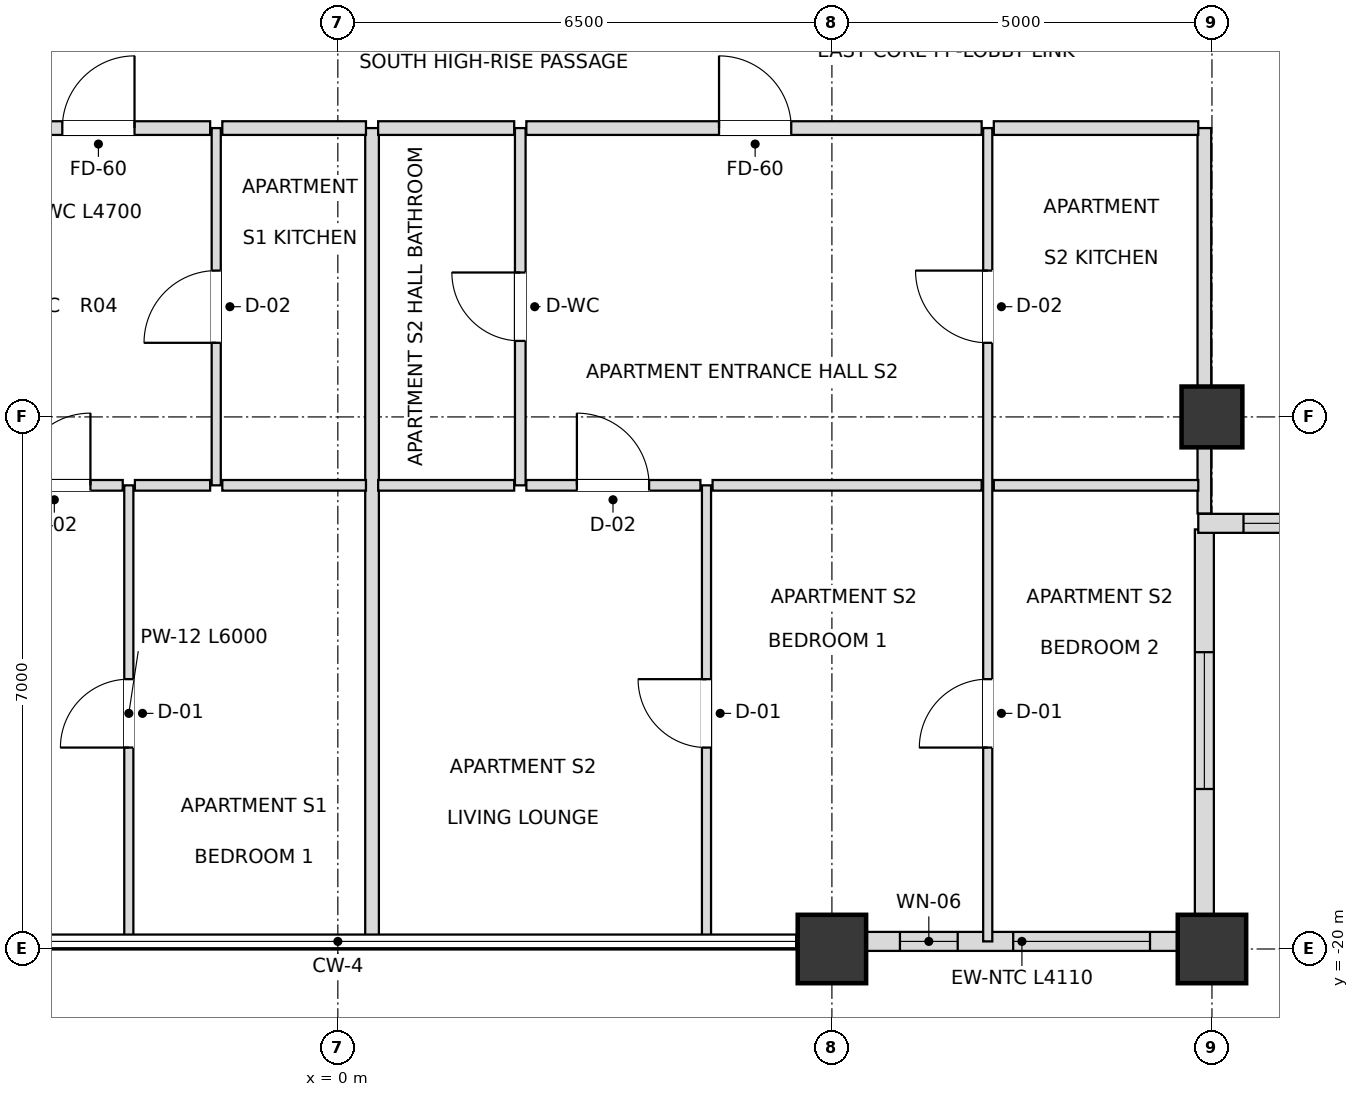
"""IFC4 building model, lengths in metres.
Left out: names, types, materials, properties, quantities, classifications, styles, units other than length and angle.
Written with IfcOpenShell. Run it as: python <this file> out.ifc"""

import sys

from ifc_helpers import new_model, si_unit, direction, frame, frame_2d, origin, origin_2d, place, context, subcontext, project, spatial, rectangle, extrude, element, fill, save


model = new_model("IFC4")
c1 = context("Model", 3, precision=1e-05, world=origin(), true_north=direction((0.0, 1.0)))
c2 = subcontext(c1, "Body", "Model", "MODEL_VIEW")
j1 = project(units=[si_unit("LENGTHUNIT", "METRE"), si_unit("PLANEANGLEUNIT", "RADIAN")], contexts=[c1])
p1 = place(None, origin())
s1 = spatial("IfcSite", under=j1, at=p1, CompositionType="ELEMENT")
p2 = place(p1, origin())
s2 = spatial("IfcBuilding", under=s1, at=p2, CompositionType="ELEMENT")
p3 = place(p2, frame((0.0, 0.0, 243.9)))
s3 = spatial("IfcBuildingStorey", under=s2, at=p3, CompositionType="ELEMENT", Elevation=243.9)
for number, where, z_axis, x_axis in (
    (1, (6.5, -20.0, 0.0), (0.0, 0.0, 1.0), (1.0, 0.0, 0.0)),
    (2, (11.5, -20.0, 0.0), (0.0, 0.0, 1.0), (1.0, 0.0, 0.0)),
):
    element("IfcColumn", number, at=place(p3, frame(where, z_axis=z_axis, x_axis=x_axis)), inside=s3, PredefinedType="USERDEFINED", context=c2, shape_type="SweptSolid", body=[
        extrude(rectangle(XDim=0.9, YDim=0.9, at=origin_2d()), origin(), (0.0, 0.0, 1.0), 3.6),
    ])
p4 = place(p3, frame((11.5, -13.0, 0.0), z_axis=(0.0, 0.0, 1.0), x_axis=(1.0, 0.0, 0.0)))
e3 = element("IfcColumn", 3, at=p4, inside=s3, PredefinedType="COLUMN", context=c2, shape_type="SweptSolid", body=[
    extrude(rectangle(XDim=0.8, YDim=0.8, at=origin_2d()), origin(), (0.0, 0.0, 1.0), 3.6),
])
p5 = place(p3, frame((6.945, -19.9, 0.0), z_axis=(0.0, 0.0, 1.0), x_axis=(1.0, 0.0, 0.0)))
e4 = element("IfcWall", 4, at=p5, inside=s3, PredefinedType="SOLIDWALL", context=c2, shape_type="SweptSolid", body=[
    extrude(rectangle(XDim=4.11, YDim=0.25, at=frame_2d((2.055, 0.0))), origin(), (0.0, 0.0, 1.0), 2.748),
])
p6 = place(p5, frame((0.45, 0.0, 0.72)))
e5 = element("IfcOpeningElement", 5, at=p6, cuts=e4, PredefinedType="OPENING", context=c2, shape_type="SweptSolid", body=[
    extrude(rectangle(XDim=0.76, YDim=1.68, at=frame_2d((0.38, 0.84))), frame((0.0, 0.135, 0.0), z_axis=(0.0, -1.0, 0.0), x_axis=(1.0, 0.0, 0.0)), (0.0, 0.0, 1.0), 0.27),
])
p7 = place(p5, frame((1.94, 0.0, 0.72)))
e6 = element("IfcOpeningElement", 6, at=p7, cuts=e4, PredefinedType="OPENING", context=c2, shape_type="SweptSolid", body=[
    extrude(rectangle(XDim=1.8, YDim=1.68, at=frame_2d((0.9, 0.84))), frame((0.0, 0.135, 0.0), z_axis=(0.0, -1.0, 0.0), x_axis=(1.0, 0.0, 0.0)), (0.0, 0.0, 1.0), 0.27),
])
p8 = place(p3, frame((11.4, -19.82, 0.0), z_axis=(0.0, 0.0, 1.0), x_axis=(0.0, 1.0, 0.0)))
e7 = element("IfcWall", 7, at=p8, inside=s3, PredefinedType="SOLIDWALL", context=c2, shape_type="SweptSolid", body=[
    extrude(rectangle(XDim=5.34, YDim=0.25, at=frame_2d((2.67, 0.0))), origin(), (0.0, 0.0, 1.0), 2.748),
])
p9 = place(p8, frame((1.925, 0.0, 0.72)))
e8 = element("IfcOpeningElement", 8, at=p9, cuts=e7, PredefinedType="OPENING", context=c2, shape_type="SweptSolid", body=[
    extrude(rectangle(XDim=1.8, YDim=1.68, at=frame_2d((0.9, 0.84))), frame((0.0, 0.135, 0.0), z_axis=(0.0, -1.0, 0.0), x_axis=(1.0, 0.0, 0.0)), (0.0, 0.0, 1.0), 0.27),
])
p10 = place(p3, frame((11.32, -14.4, 0.0), z_axis=(0.0, 0.0, 1.0), x_axis=(1.0, 0.0, 0.0)))
e9 = element("IfcWall", 9, at=p10, inside=s3, PredefinedType="SOLIDWALL", context=c2, shape_type="SweptSolid", body=[
    extrude(rectangle(XDim=5.66, YDim=0.25, at=frame_2d((2.83, 0.0))), origin(), (0.0, 0.0, 1.0), 2.748),
])
p11 = place(p10, frame((0.595, 0.0, 0.72)))
e10 = element("IfcOpeningElement", 10, at=p11, cuts=e9, PredefinedType="OPENING", context=c2, shape_type="SweptSolid", body=[
    extrude(rectangle(XDim=1.8, YDim=1.68, at=frame_2d((0.9, 0.84))), frame((0.0, 0.135, 0.0), z_axis=(0.0, -1.0, 0.0), x_axis=(1.0, 0.0, 0.0)), (0.0, 0.0, 1.0), 0.27),
])
p12 = place(p10, frame((3.265, 0.0, 0.72)))
e11 = element("IfcOpeningElement", 11, at=p12, cuts=e9, PredefinedType="OPENING", context=c2, shape_type="SweptSolid", body=[
    extrude(rectangle(XDim=1.8, YDim=1.68, at=frame_2d((0.9, 0.84))), frame((0.0, 0.135, 0.0), z_axis=(0.0, -1.0, 0.0), x_axis=(1.0, 0.0, 0.0)), (0.0, 0.0, 1.0), 0.27),
])
p13 = place(p3, frame((-2.75, -19.9, 0.0), z_axis=(0.0, 0.0, 1.0), x_axis=(0.0, 1.0, 0.0)))
e12 = element("IfcWall", 12, at=p13, inside=s3, PredefinedType="PARTITIONING", context=c2, shape_type="SweptSolid", body=[
    extrude(rectangle(XDim=6.0, YDim=0.12, at=frame_2d((3.0, 0.0))), origin(), (0.0, 0.0, 1.0), 3.018),
])
p14 = place(p13, frame((2.55, 0.0, 0.0)))
e13 = element("IfcOpeningElement", 13, at=p14, cuts=e12, PredefinedType="OPENING", context=c2, shape_type="SweptSolid", body=[
    extrude(rectangle(XDim=0.9, YDim=2.1, at=frame_2d((0.45, 1.05))), frame((0.0, 0.07, 0.0), z_axis=(0.0, -1.0, 0.0), x_axis=(1.0, 0.0, 0.0)), (0.0, 0.0, 1.0), 0.14),
])
p15 = place(p3, frame((-1.6, -13.9, 0.0), z_axis=(0.0, 0.0, 1.0), x_axis=(0.0, 1.0, 0.0)))
e14 = element("IfcWall", 14, at=p15, inside=s3, PredefinedType="PARTITIONING", context=c2, shape_type="SweptSolid", body=[
    extrude(rectangle(XDim=4.7, YDim=0.12, at=frame_2d((2.35, 0.0))), origin(), (0.0, 0.0, 1.0), 3.38),
])
p16 = place(p15, frame((1.875, 0.0, 0.0)))
e15 = element("IfcOpeningElement", 15, at=p16, cuts=e14, PredefinedType="OPENING", context=c2, shape_type="SweptSolid", body=[
    extrude(rectangle(XDim=0.95, YDim=2.1, at=frame_2d((0.475, 1.05))), frame((0.0, 0.07, 0.0), z_axis=(0.0, -1.0, 0.0), x_axis=(1.0, 0.0, 0.0)), (0.0, 0.0, 1.0), 0.14),
])
p17 = place(p3, frame((0.45, -19.9, 0.0), z_axis=(0.0, 0.0, 1.0), x_axis=(0.0, 1.0, 0.0)))
e16 = element("IfcWall", 16, at=p17, inside=s3, PredefinedType="PARTITIONING", context=c2, shape_type="SweptSolid", body=[
    extrude(rectangle(XDim=10.7, YDim=0.18, at=frame_2d((5.35, 0.0))), origin(), (0.0, 0.0, 1.0), 3.018),
])
p18 = place(p3, frame((2.4, -13.9, 0.0), z_axis=(0.0, 0.0, 1.0), x_axis=(0.0, 1.0, 0.0)))
e17 = element("IfcWall", 17, at=p18, inside=s3, PredefinedType="PARTITIONING", context=c2, shape_type="SweptSolid", body=[
    extrude(rectangle(XDim=4.7, YDim=0.14, at=frame_2d((2.35, 0.0))), origin(), (0.0, 0.0, 1.0), 3.38),
])
p19 = place(p18, frame((1.9, 0.0, 0.0)))
e18 = element("IfcOpeningElement", 18, at=p19, cuts=e17, PredefinedType="OPENING", context=c2, shape_type="SweptSolid", body=[
    extrude(rectangle(XDim=0.9, YDim=2.1, at=frame_2d((0.45, 1.05))), frame((0.0, 0.08, 0.0), z_axis=(0.0, -1.0, 0.0), x_axis=(1.0, 0.0, 0.0)), (0.0, 0.0, 1.0), 0.16),
])
p20 = place(p3, frame((4.85, -19.9, 0.0), z_axis=(0.0, 0.0, 1.0), x_axis=(0.0, 1.0, 0.0)))
e19 = element("IfcWall", 19, at=p20, inside=s3, PredefinedType="PARTITIONING", context=c2, shape_type="SweptSolid", body=[
    extrude(rectangle(XDim=6.0, YDim=0.12, at=frame_2d((3.0, 0.0))), origin(), (0.0, 0.0, 1.0), 3.018),
])
p21 = place(p20, frame((2.55, 0.0, 0.0)))
e20 = element("IfcOpeningElement", 20, at=p21, cuts=e19, PredefinedType="OPENING", context=c2, shape_type="SweptSolid", body=[
    extrude(rectangle(XDim=0.9, YDim=2.1, at=frame_2d((0.45, 1.05))), frame((0.0, 0.07, 0.0), z_axis=(0.0, -1.0, 0.0), x_axis=(1.0, 0.0, 0.0)), (0.0, 0.0, 1.0), 0.14),
])
p22 = place(p3, frame((8.55, -19.9, 0.0), z_axis=(0.0, 0.0, 1.0), x_axis=(0.0, 1.0, 0.0)))
e21 = element("IfcWall", 21, at=p22, inside=s3, PredefinedType="PARTITIONING", context=c2, shape_type="SweptSolid", body=[
    extrude(rectangle(XDim=10.7, YDim=0.12, at=frame_2d((5.35, 0.0))), origin(), (0.0, 0.0, 1.0), 2.826),
])
p23 = place(p22, frame((7.875, 0.0, 0.0)))
e22 = element("IfcOpeningElement", 22, at=p23, cuts=e21, PredefinedType="OPENING", context=c2, shape_type="SweptSolid", body=[
    extrude(rectangle(XDim=0.95, YDim=2.1, at=frame_2d((0.475, 1.05))), frame((0.0, 0.07, 0.0), z_axis=(0.0, -1.0, 0.0), x_axis=(1.0, 0.0, 0.0)), (0.0, 0.0, 1.0), 0.14),
])
p24 = place(p22, frame((2.55, 0.0, 0.0)))
e23 = element("IfcOpeningElement", 23, at=p24, cuts=e21, PredefinedType="OPENING", context=c2, shape_type="SweptSolid", body=[
    extrude(rectangle(XDim=0.9, YDim=2.1, at=frame_2d((0.45, 1.05))), frame((0.0, 0.07, 0.0), z_axis=(0.0, -1.0, 0.0), x_axis=(1.0, 0.0, 0.0)), (0.0, 0.0, 1.0), 0.14),
])
p25 = place(p3, frame((11.4, -14.27, 0.0), z_axis=(0.0, 0.0, 1.0), x_axis=(0.0, 1.0, 0.0)))
e24 = element("IfcWall", 24, at=p25, inside=s3, PredefinedType="PARTITIONING", context=c2, shape_type="SweptSolid", body=[
    extrude(rectangle(XDim=5.07, YDim=0.18, at=frame_2d((2.535, 0.0))), origin(), (0.0, 0.0, 1.0), 2.748),
])
p26 = place(p3, frame((-4.62, -13.9, 0.0), z_axis=(0.0, 0.0, 1.0), x_axis=(1.0, 0.0, 0.0)))
e25 = element("IfcWall", 25, at=p26, inside=s3, PredefinedType="PARTITIONING", context=c2, shape_type="SweptSolid", body=[
    extrude(rectangle(XDim=1.79, YDim=0.14, at=frame_2d((0.895, 0.0))), origin(), (0.0, 0.0, 1.0), 3.38),
])
p27 = place(p26, frame((0.415, 0.0, 0.0)))
e26 = element("IfcOpeningElement", 26, at=p27, cuts=e25, PredefinedType="OPENING", context=c2, shape_type="SweptSolid", body=[
    extrude(rectangle(XDim=0.95, YDim=2.1, at=frame_2d((0.475, 1.05))), frame((0.0, 0.08, 0.0), z_axis=(0.0, -1.0, 0.0), x_axis=(1.0, 0.0, 0.0)), (0.0, 0.0, 1.0), 0.16),
])
p28 = place(p3, frame((-2.67, -13.9, 0.0), z_axis=(0.0, 0.0, 1.0), x_axis=(1.0, 0.0, 0.0)))
e27 = element("IfcWall", 27, at=p28, inside=s3, PredefinedType="PARTITIONING", context=c2, shape_type="SweptSolid", body=[
    extrude(rectangle(XDim=0.99, YDim=0.14, at=frame_2d((0.495, 0.0))), origin(), (0.0, 0.0, 1.0), 3.38),
])
p29 = place(p3, frame((-1.52, -13.9, 0.0), z_axis=(0.0, 0.0, 1.0), x_axis=(1.0, 0.0, 0.0)))
e28 = element("IfcWall", 28, at=p29, inside=s3, PredefinedType="PARTITIONING", context=c2, shape_type="SweptSolid", body=[
    extrude(rectangle(XDim=1.89, YDim=0.14, at=frame_2d((0.945, 0.0))), origin(), (0.0, 0.0, 1.0), 3.38),
])
p30 = place(p3, frame((0.53, -13.9, 0.0), z_axis=(0.0, 0.0, 1.0), x_axis=(1.0, 0.0, 0.0)))
e29 = element("IfcWall", 29, at=p30, inside=s3, PredefinedType="PARTITIONING", context=c2, shape_type="SweptSolid", body=[
    extrude(rectangle(XDim=1.79, YDim=0.14, at=frame_2d((0.895, 0.0))), origin(), (0.0, 0.0, 1.0), 3.38),
])
p31 = place(p3, frame((2.48, -13.9, 0.0), z_axis=(0.0, 0.0, 1.0), x_axis=(1.0, 0.0, 0.0)))
e30 = element("IfcWall", 30, at=p31, inside=s3, PredefinedType="PARTITIONING", context=c2, shape_type="SweptSolid", body=[
    extrude(rectangle(XDim=2.29, YDim=0.14, at=frame_2d((1.145, 0.0))), origin(), (0.0, 0.0, 1.0), 3.38),
])
p32 = place(p31, frame((0.665, 0.0, 0.0)))
e31 = element("IfcOpeningElement", 31, at=p32, cuts=e30, PredefinedType="OPENING", context=c2, shape_type="SweptSolid", body=[
    extrude(rectangle(XDim=0.95, YDim=2.1, at=frame_2d((0.475, 1.05))), frame((0.0, 0.08, 0.0), z_axis=(0.0, -1.0, 0.0), x_axis=(1.0, 0.0, 0.0)), (0.0, 0.0, 1.0), 0.16),
])
p33 = place(p3, frame((4.93, -13.9, 0.0), z_axis=(0.0, 0.0, 1.0), x_axis=(1.0, 0.0, 0.0)))
e32 = element("IfcWall", 32, at=p33, inside=s3, PredefinedType="PARTITIONING", context=c2, shape_type="SweptSolid", body=[
    extrude(rectangle(XDim=3.54, YDim=0.14, at=frame_2d((1.77, 0.0))), origin(), (0.0, 0.0, 1.0), 2.826),
])
p34 = place(p3, frame((8.63, -13.9, 0.0), z_axis=(0.0, 0.0, 1.0), x_axis=(1.0, 0.0, 0.0)))
e33 = element("IfcWall", 33, at=p34, inside=s3, PredefinedType="PARTITIONING", context=c2, shape_type="SweptSolid", body=[
    extrude(rectangle(XDim=2.69, YDim=0.14, at=frame_2d((1.345, 0.0))), origin(), (0.0, 0.0, 1.0), 3.38),
])
p35 = place(p3, frame((-4.62, -9.2, 0.0), z_axis=(0.0, 0.0, 1.0), x_axis=(1.0, 0.0, 0.0)))
e34 = element("IfcWall", 34, at=p35, inside=s3, PredefinedType="PARTITIONING", context=c2, shape_type="SweptSolid", body=[
    extrude(rectangle(XDim=2.94, YDim=0.18, at=frame_2d((1.47, 0.0))), origin(), (0.0, 0.0, 1.0), 3.38),
])
p36 = place(p35, frame((0.995, 0.0, 0.0)))
e35 = element("IfcOpeningElement", 35, at=p36, cuts=e34, PredefinedType="OPENING", context=c2, shape_type="SweptSolid", body=[
    extrude(rectangle(XDim=0.95, YDim=2.15, at=frame_2d((0.475, 1.075))), frame((0.0, 0.1, 0.0), z_axis=(0.0, -1.0, 0.0), x_axis=(1.0, 0.0, 0.0)), (0.0, 0.0, 1.0), 0.2),
])
p37 = place(p3, frame((-1.52, -9.2, 0.0), z_axis=(0.0, 0.0, 1.0), x_axis=(1.0, 0.0, 0.0)))
e36 = element("IfcWall", 36, at=p37, inside=s3, PredefinedType="PARTITIONING", context=c2, shape_type="SweptSolid", body=[
    extrude(rectangle(XDim=1.89, YDim=0.18, at=frame_2d((0.945, 0.0))), origin(), (0.0, 0.0, 1.0), 3.38),
])
p38 = place(p3, frame((0.53, -9.2, 0.0), z_axis=(0.0, 0.0, 1.0), x_axis=(1.0, 0.0, 0.0)))
e37 = element("IfcWall", 37, at=p38, inside=s3, PredefinedType="PARTITIONING", context=c2, shape_type="SweptSolid", body=[
    extrude(rectangle(XDim=1.79, YDim=0.18, at=frame_2d((0.895, 0.0))), origin(), (0.0, 0.0, 1.0), 3.38),
])
p39 = place(p3, frame((2.48, -9.2, 0.0), z_axis=(0.0, 0.0, 1.0), x_axis=(1.0, 0.0, 0.0)))
e38 = element("IfcWall", 38, at=p39, inside=s3, PredefinedType="PARTITIONING", context=c2, shape_type="SweptSolid", body=[
    extrude(rectangle(XDim=5.99, YDim=0.18, at=frame_2d((2.995, 0.0))), origin(), (0.0, 0.0, 1.0), 2.826),
])
p40 = place(p39, frame((2.535, 0.0, 0.0)))
e39 = element("IfcOpeningElement", 39, at=p40, cuts=e38, PredefinedType="OPENING", context=c2, shape_type="SweptSolid", body=[
    extrude(rectangle(XDim=0.95, YDim=2.15, at=frame_2d((0.475, 1.075))), frame((0.0, 0.1, 0.0), z_axis=(0.0, -1.0, 0.0), x_axis=(1.0, 0.0, 0.0)), (0.0, 0.0, 1.0), 0.2),
])
p41 = place(p3, frame((8.63, -9.2, 0.0), z_axis=(0.0, 0.0, 1.0), x_axis=(1.0, 0.0, 0.0)))
e40 = element("IfcWall", 40, at=p41, inside=s3, PredefinedType="PARTITIONING", context=c2, shape_type="SweptSolid", body=[
    extrude(rectangle(XDim=2.69, YDim=0.18, at=frame_2d((1.345, 0.0))), origin(), (0.0, 0.0, 1.0), 3.38),
])
p42 = place(p6, origin())
e41 = element("IfcWindow", 41, at=p42, inside=s3, PartitioningType="SINGLE_PANEL", PredefinedType="WINDOW", context=c2, shape_type="SweptSolid", body=[
    extrude(rectangle(XDim=0.76, YDim=1.68, at=frame_2d((0.38, 0.84))), frame((0.0, 0.03, 0.0), z_axis=(0.0, -1.0, 0.0), x_axis=(1.0, 0.0, 0.0)), (0.0, 0.0, 1.0), 0.06),
])
fill(e5, e41)
p43 = place(p7, origin())
e42 = element("IfcWindow", 42, at=p43, inside=s3, PartitioningType="SINGLE_PANEL", PredefinedType="WINDOW", context=c2, shape_type="SweptSolid", body=[
    extrude(rectangle(XDim=1.8, YDim=1.68, at=frame_2d((0.9, 0.84))), frame((0.0, 0.03, 0.0), z_axis=(0.0, -1.0, 0.0), x_axis=(1.0, 0.0, 0.0)), (0.0, 0.0, 1.0), 0.06),
])
fill(e6, e42)
p44 = place(p9, origin())
e43 = element("IfcWindow", 43, at=p44, inside=s3, PartitioningType="SINGLE_PANEL", PredefinedType="WINDOW", context=c2, shape_type="SweptSolid", body=[
    extrude(rectangle(XDim=1.8, YDim=1.68, at=frame_2d((0.9, 0.84))), frame((0.0, 0.03, 0.0), z_axis=(0.0, -1.0, 0.0), x_axis=(1.0, 0.0, 0.0)), (0.0, 0.0, 1.0), 0.06),
])
fill(e8, e43)
p45 = place(p11, origin())
e44 = element("IfcWindow", 44, at=p45, inside=s3, PartitioningType="SINGLE_PANEL", PredefinedType="WINDOW", context=c2, shape_type="SweptSolid", body=[
    extrude(rectangle(XDim=1.8, YDim=1.68, at=frame_2d((0.9, 0.84))), frame((0.0, 0.03, 0.0), z_axis=(0.0, -1.0, 0.0), x_axis=(1.0, 0.0, 0.0)), (0.0, 0.0, 1.0), 0.06),
])
fill(e10, e44)
p46 = place(p36, origin())
e45 = element("IfcDoor", 45, at=p46, inside=s3, OperationType="SINGLE_SWING_RIGHT", PredefinedType="DOOR", context=c2, shape_type="SweptSolid", body=[
    extrude(rectangle(XDim=0.95, YDim=2.15, at=frame_2d((0.475, 1.075))), frame((0.0, 0.025, 0.0), z_axis=(0.0, -1.0, 0.0), x_axis=(1.0, 0.0, 0.0)), (0.0, 0.0, 1.0), 0.05),
])
fill(e35, e45)
p47 = place(p16, origin())
e46 = element("IfcDoor", 46, at=p47, inside=s3, OperationType="SINGLE_SWING_LEFT", PredefinedType="DOOR", context=c2, shape_type="SweptSolid", body=[
    extrude(rectangle(XDim=0.95, YDim=2.1, at=frame_2d((0.475, 1.05))), frame((0.0, 0.025, 0.0), z_axis=(0.0, -1.0, 0.0), x_axis=(1.0, 0.0, 0.0)), (0.0, 0.0, 1.0), 0.05),
])
fill(e15, e46)
p48 = place(p27, origin())
e47 = element("IfcDoor", 47, at=p48, inside=s3, OperationType="SINGLE_SWING_RIGHT", PredefinedType="DOOR", context=c2, shape_type="SweptSolid", body=[
    extrude(rectangle(XDim=0.95, YDim=2.1, at=frame_2d((0.475, 1.05))), frame((0.0, 0.025, 0.0), z_axis=(0.0, -1.0, 0.0), x_axis=(1.0, 0.0, 0.0)), (0.0, 0.0, 1.0), 0.05),
])
fill(e26, e47)
p49 = place(p14, origin())
e48 = element("IfcDoor", 48, at=p49, inside=s3, OperationType="SINGLE_SWING_LEFT", PredefinedType="DOOR", context=c2, shape_type="SweptSolid", body=[
    extrude(rectangle(XDim=0.9, YDim=2.1, at=frame_2d((0.45, 1.05))), frame((0.0, 0.025, 0.0), z_axis=(0.0, -1.0, 0.0), x_axis=(1.0, 0.0, 0.0)), (0.0, 0.0, 1.0), 0.05),
])
fill(e13, e48)
p50 = place(p19, origin())
e49 = element("IfcDoor", 49, at=p50, inside=s3, OperationType="SINGLE_SWING_RIGHT", PredefinedType="DOOR", context=c2, shape_type="SweptSolid", body=[
    extrude(rectangle(XDim=0.9, YDim=2.1, at=frame_2d((0.45, 1.05))), frame((0.0, 0.025, 0.0), z_axis=(0.0, -1.0, 0.0), x_axis=(1.0, 0.0, 0.0)), (0.0, 0.0, 1.0), 0.05),
])
fill(e18, e49)
p51 = place(p40, origin())
e50 = element("IfcDoor", 50, at=p51, inside=s3, OperationType="SINGLE_SWING_LEFT", PredefinedType="DOOR", context=c2, shape_type="SweptSolid", body=[
    extrude(rectangle(XDim=0.95, YDim=2.15, at=frame_2d((0.475, 1.075))), frame((0.0, 0.025, 0.0), z_axis=(0.0, -1.0, 0.0), x_axis=(1.0, 0.0, 0.0)), (0.0, 0.0, 1.0), 0.05),
])
fill(e39, e50)
p52 = place(p23, origin())
e51 = element("IfcDoor", 51, at=p52, inside=s3, OperationType="SINGLE_SWING_RIGHT", PredefinedType="DOOR", context=c2, shape_type="SweptSolid", body=[
    extrude(rectangle(XDim=0.95, YDim=2.1, at=frame_2d((0.475, 1.05))), frame((0.0, 0.025, 0.0), z_axis=(0.0, -1.0, 0.0), x_axis=(1.0, 0.0, 0.0)), (0.0, 0.0, 1.0), 0.05),
])
fill(e22, e51)
p53 = place(p32, origin())
e52 = element("IfcDoor", 52, at=p53, inside=s3, OperationType="SINGLE_SWING_LEFT", PredefinedType="DOOR", context=c2, shape_type="SweptSolid", body=[
    extrude(rectangle(XDim=0.95, YDim=2.1, at=frame_2d((0.475, 1.05))), frame((0.0, 0.025, 0.0), z_axis=(0.0, -1.0, 0.0), x_axis=(1.0, 0.0, 0.0)), (0.0, 0.0, 1.0), 0.05),
])
fill(e31, e52)
p54 = place(p21, origin())
e53 = element("IfcDoor", 53, at=p54, inside=s3, OperationType="SINGLE_SWING_RIGHT", PredefinedType="DOOR", context=c2, shape_type="SweptSolid", body=[
    extrude(rectangle(XDim=0.9, YDim=2.1, at=frame_2d((0.45, 1.05))), frame((0.0, 0.025, 0.0), z_axis=(0.0, -1.0, 0.0), x_axis=(1.0, 0.0, 0.0)), (0.0, 0.0, 1.0), 0.05),
])
fill(e20, e53)
p55 = place(p24, origin())
e54 = element("IfcDoor", 54, at=p55, inside=s3, OperationType="SINGLE_SWING_LEFT", PredefinedType="DOOR", context=c2, shape_type="SweptSolid", body=[
    extrude(rectangle(XDim=0.9, YDim=2.1, at=frame_2d((0.45, 1.05))), frame((0.0, 0.025, 0.0), z_axis=(0.0, -1.0, 0.0), x_axis=(1.0, 0.0, 0.0)), (0.0, 0.0, 1.0), 0.05),
])
fill(e23, e54)
save(model, sys.argv[1])
